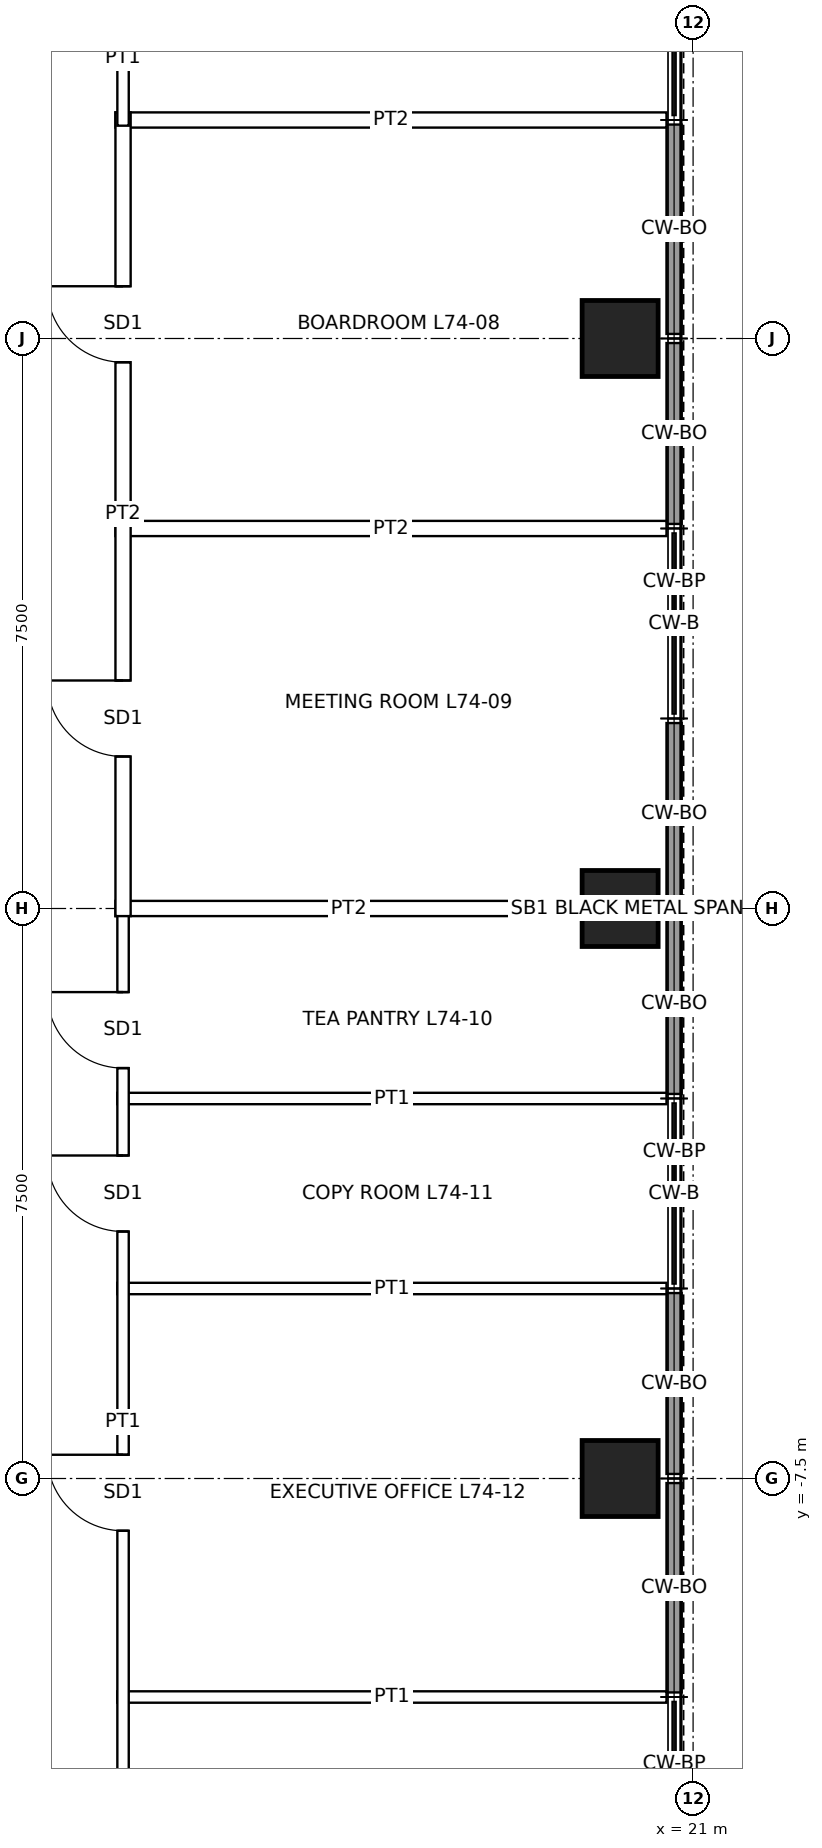
"""IFC4 building model, lengths in metres.
Left out: names, types, materials, properties, quantities, classifications, styles, units other than length and angle.
Written with IfcOpenShell. Run it as: python <this file> out.ifc"""

import sys

from ifc_helpers import new_model, si_unit, direction, frame, frame_2d, origin, origin_2d, place, context, subcontext, project, spatial, rectangle, hollow_rectangle, extrude, element, fill, save


model = new_model("IFC4")
c1 = context("Model", 3, precision=1e-05, world=origin(), true_north=direction((0.0, 1.0)))
c2 = subcontext(c1, "Body", "Model", "MODEL_VIEW")
j1 = project(units=[si_unit("LENGTHUNIT", "METRE"), si_unit("PLANEANGLEUNIT", "RADIAN")], contexts=[c1])
p1 = place(None, origin())
s1 = spatial("IfcSite", under=j1, at=p1, CompositionType="ELEMENT")
p2 = place(p1, origin())
s2 = spatial("IfcBuilding", under=s1, at=p2, CompositionType="ELEMENT")
p3 = place(p2, frame((0.0, 0.0, 331.9)))
s3 = spatial("IfcBuildingStorey", under=s2, at=p3, CompositionType="ELEMENT", Elevation=331.9)
for number, where, z_axis, x_axis in (
    (1, (20.04, 7.5, 0.0), (0.0, 0.0, 1.0), (1.0, 0.0, 0.0)),
    (2, (20.04, 0.0, 0.0), (0.0, 0.0, 1.0), (1.0, 0.0, 0.0)),
    (3, (20.04, -7.5, 0.0), (0.0, 0.0, 1.0), (1.0, 0.0, 0.0)),
):
    element("IfcColumn", number, at=place(p3, frame(where, z_axis=z_axis, x_axis=x_axis)), inside=s3, PredefinedType="COLUMN", context=c2, shape_type="SweptSolid", body=[
        extrude(hollow_rectangle(XDim=1.0, YDim=1.0, WallThickness=0.075, at=origin_2d()), origin(), (0.0, 0.0, 1.0), 4.0),
    ])
p4 = place(p3, frame((20.75, 10.315, 0.0), z_axis=(0.0, 0.0, 1.0), x_axis=(0.0, -1.0, 0.0)))
e4 = element("IfcWall", 4, at=p4, inside=s3, PredefinedType="SOLIDWALL", context=c2, shape_type="SweptSolid", body=[
    extrude(rectangle(XDim=2.755, YDim=0.2, at=frame_2d((1.377, 0.0))), origin(), (0.0, 0.0, 1.0), 3.8),
])
for number, where, z_axis, x_axis in (
    (5, (20.75, 7.44, 0.0), (0.0, 0.0, 1.0), (0.0, -1.0, 0.0)),
    (6, (20.75, 2.44, 0.0), (0.0, 0.0, 1.0), (0.0, -1.0, 0.0)),
    (7, (20.75, -0.06, 0.0), (0.0, 0.0, 1.0), (0.0, -1.0, 0.0)),
    (8, (20.75, -5.06, 0.0), (0.0, 0.0, 1.0), (0.0, -1.0, 0.0)),
):
    element("IfcWall", number, at=place(p3, frame(where, z_axis=z_axis, x_axis=x_axis)), inside=s3, PredefinedType="SOLIDWALL", context=c2, shape_type="SweptSolid", body=[
        extrude(rectangle(XDim=2.38, YDim=0.2, at=frame_2d((1.19, 0.0))), origin(), (0.0, 0.0, 1.0), 3.8),
    ])
p5 = place(p3, frame((20.75, -7.56, 0.0), z_axis=(0.0, 0.0, 1.0), x_axis=(0.0, -1.0, 0.0)))
e9 = element("IfcWall", 9, at=p5, inside=s3, PredefinedType="SOLIDWALL", context=c2, shape_type="SweptSolid", body=[
    extrude(rectangle(XDim=2.755, YDim=0.2, at=frame_2d((1.377, 0.0))), origin(), (0.0, 0.0, 1.0), 3.8),
])
for number, where, z_axis, x_axis in (
    (10, (13.425, -10.375, 0.0), (0.0, 0.0, 1.0), (1.0, 0.0, 0.0)),
    (11, (13.425, -5.0, 0.0), (0.0, 0.0, 1.0), (1.0, 0.0, 0.0)),
    (12, (13.425, -2.5, 0.0), (0.0, 0.0, 1.0), (1.0, 0.0, 0.0)),
):
    element("IfcWall", number, at=place(p3, frame(where, z_axis=z_axis, x_axis=x_axis)), inside=s3, PredefinedType="PARTITIONING", context=c2, shape_type="SweptSolid", body=[
        extrude(rectangle(XDim=7.225, YDim=0.15, at=frame_2d((3.612, 0.0))), origin(), (0.0, 0.0, 1.0), 3.8),
    ])
p6 = place(p3, frame((13.4, 0.0, 0.0), z_axis=(0.0, 0.0, 1.0), x_axis=(1.0, 0.0, 0.0)))
e13 = element("IfcWall", 13, at=p6, inside=s3, PredefinedType="PARTITIONING", context=c2, shape_type="SweptSolid", body=[
    extrude(rectangle(XDim=6.14, YDim=0.2, at=frame_2d((3.07, 0.0))), origin(), (0.0, 0.0, 1.0), 2.769),
])
for number, where, z_axis, x_axis in (
    (14, (13.4, 5.0, 0.0), (0.0, 0.0, 1.0), (1.0, 0.0, 0.0)),
    (15, (13.4, 10.375, 0.0), (0.0, 0.0, 1.0), (1.0, 0.0, 0.0)),
):
    element("IfcWall", number, at=place(p3, frame(where, z_axis=z_axis, x_axis=x_axis)), inside=s3, PredefinedType="PARTITIONING", context=c2, shape_type="SweptSolid", body=[
        extrude(rectangle(XDim=7.25, YDim=0.2, at=frame_2d((3.625, 0.0))), origin(), (0.0, 0.0, 1.0), 3.8),
    ])
p7 = place(p3, frame((13.5, -13.575, 0.0), z_axis=(0.0, 0.0, 1.0), x_axis=(0.0, 1.0, 0.0)))
e16 = element("IfcWall", 16, at=p7, inside=s3, PredefinedType="PARTITIONING", context=c2, shape_type="SweptSolid", body=[
    extrude(rectangle(XDim=13.65, YDim=0.15, at=frame_2d((6.825, 0.0))), origin(), (0.0, 0.0, 1.0), 3.8),
])
p8 = place(p7, frame((11.475, 0.0, 0.0)))
e17 = element("IfcOpeningElement", 17, at=p8, cuts=e16, PredefinedType="OPENING", context=c2, shape_type="SweptSolid", body=[
    extrude(rectangle(XDim=1.0, YDim=2.4, at=frame_2d((0.5, 1.2))), frame((0.0, 0.085, 0.0), z_axis=(0.0, -1.0, 0.0), x_axis=(1.0, 0.0, 0.0)), (0.0, 0.0, 1.0), 0.17),
])
p9 = place(p7, frame((9.325, 0.0, 0.0)))
e18 = element("IfcOpeningElement", 18, at=p9, cuts=e16, PredefinedType="OPENING", context=c2, shape_type="SweptSolid", body=[
    extrude(rectangle(XDim=1.0, YDim=2.4, at=frame_2d((0.5, 1.2))), frame((0.0, 0.085, 0.0), z_axis=(0.0, -1.0, 0.0), x_axis=(1.0, 0.0, 0.0)), (0.0, 0.0, 1.0), 0.17),
])
p10 = place(p7, frame((5.387, 0.0, 0.0)))
e19 = element("IfcOpeningElement", 19, at=p10, cuts=e16, PredefinedType="OPENING", context=c2, shape_type="SweptSolid", body=[
    extrude(rectangle(XDim=1.0, YDim=2.4, at=frame_2d((0.5, 1.2))), frame((0.0, 0.085, 0.0), z_axis=(0.0, -1.0, 0.0), x_axis=(1.0, 0.0, 0.0)), (0.0, 0.0, 1.0), 0.17),
])
p11 = place(p3, frame((13.5, -0.1, 0.0), z_axis=(0.0, 0.0, 1.0), x_axis=(0.0, 1.0, 0.0)))
e20 = element("IfcWall", 20, at=p11, inside=s3, PredefinedType="PARTITIONING", context=c2, shape_type="SweptSolid", body=[
    extrude(rectangle(XDim=10.575, YDim=0.2, at=frame_2d((5.288, 0.0))), origin(), (0.0, 0.0, 1.0), 3.8),
])
p12 = place(p11, frame((7.288, 0.0, 0.0)))
e21 = element("IfcOpeningElement", 21, at=p12, cuts=e20, PredefinedType="OPENING", context=c2, shape_type="SweptSolid", body=[
    extrude(rectangle(XDim=1.0, YDim=2.4, at=frame_2d((0.5, 1.2))), frame((0.0, 0.11, 0.0), z_axis=(0.0, -1.0, 0.0), x_axis=(1.0, 0.0, 0.0)), (0.0, 0.0, 1.0), 0.22),
])
p13 = place(p11, frame((2.1, 0.0, 0.0)))
e22 = element("IfcOpeningElement", 22, at=p13, cuts=e20, PredefinedType="OPENING", context=c2, shape_type="SweptSolid", body=[
    extrude(rectangle(XDim=1.0, YDim=2.4, at=frame_2d((0.5, 1.2))), frame((0.0, 0.11, 0.0), z_axis=(0.0, -1.0, 0.0), x_axis=(1.0, 0.0, 0.0)), (0.0, 0.0, 1.0), 0.22),
])
p14 = place(p3, frame((13.5, 10.3, 0.0), z_axis=(0.0, 0.0, 1.0), x_axis=(0.0, 1.0, 0.0)))
e23 = element("IfcWall", 23, at=p14, inside=s3, PredefinedType="PARTITIONING", context=c2, shape_type="SweptSolid", body=[
    extrude(rectangle(XDim=1.775, YDim=0.15, at=frame_2d((0.887, 0.0))), origin(), (0.0, 0.0, 1.0), 3.8),
])
p15 = place(p12, origin())
e24 = element("IfcDoor", 24, at=p15, inside=s3, OperationType="SINGLE_SWING_RIGHT", PredefinedType="DOOR", context=c2, shape_type="SweptSolid", body=[
    extrude(rectangle(XDim=1.0, YDim=2.4, at=frame_2d((0.5, 1.2))), frame((0.0, 0.025, 0.0), z_axis=(0.0, -1.0, 0.0), x_axis=(1.0, 0.0, 0.0)), (0.0, 0.0, 1.0), 0.05),
])
fill(e21, e24)
p16 = place(p13, origin())
e25 = element("IfcDoor", 25, at=p16, inside=s3, OperationType="SINGLE_SWING_RIGHT", PredefinedType="DOOR", context=c2, shape_type="SweptSolid", body=[
    extrude(rectangle(XDim=1.0, YDim=2.4, at=frame_2d((0.5, 1.2))), frame((0.0, 0.025, 0.0), z_axis=(0.0, -1.0, 0.0), x_axis=(1.0, 0.0, 0.0)), (0.0, 0.0, 1.0), 0.05),
])
fill(e22, e25)
p17 = place(p8, origin())
e26 = element("IfcDoor", 26, at=p17, inside=s3, OperationType="SINGLE_SWING_RIGHT", PredefinedType="DOOR", context=c2, shape_type="SweptSolid", body=[
    extrude(rectangle(XDim=1.0, YDim=2.4, at=frame_2d((0.5, 1.2))), frame((0.0, 0.025, 0.0), z_axis=(0.0, -1.0, 0.0), x_axis=(1.0, 0.0, 0.0)), (0.0, 0.0, 1.0), 0.05),
])
fill(e17, e26)
p18 = place(p9, origin())
e27 = element("IfcDoor", 27, at=p18, inside=s3, OperationType="SINGLE_SWING_RIGHT", PredefinedType="DOOR", context=c2, shape_type="SweptSolid", body=[
    extrude(rectangle(XDim=1.0, YDim=2.4, at=frame_2d((0.5, 1.2))), frame((0.0, 0.025, 0.0), z_axis=(0.0, -1.0, 0.0), x_axis=(1.0, 0.0, 0.0)), (0.0, 0.0, 1.0), 0.05),
])
fill(e18, e27)
p19 = place(p10, origin())
e28 = element("IfcDoor", 28, at=p19, inside=s3, OperationType="SINGLE_SWING_RIGHT", PredefinedType="DOOR", context=c2, shape_type="SweptSolid", body=[
    extrude(rectangle(XDim=1.0, YDim=2.4, at=frame_2d((0.5, 1.2))), frame((0.0, 0.025, 0.0), z_axis=(0.0, -1.0, 0.0), x_axis=(1.0, 0.0, 0.0)), (0.0, 0.0, 1.0), 0.05),
])
fill(e19, e28)
save(model, sys.argv[1])
